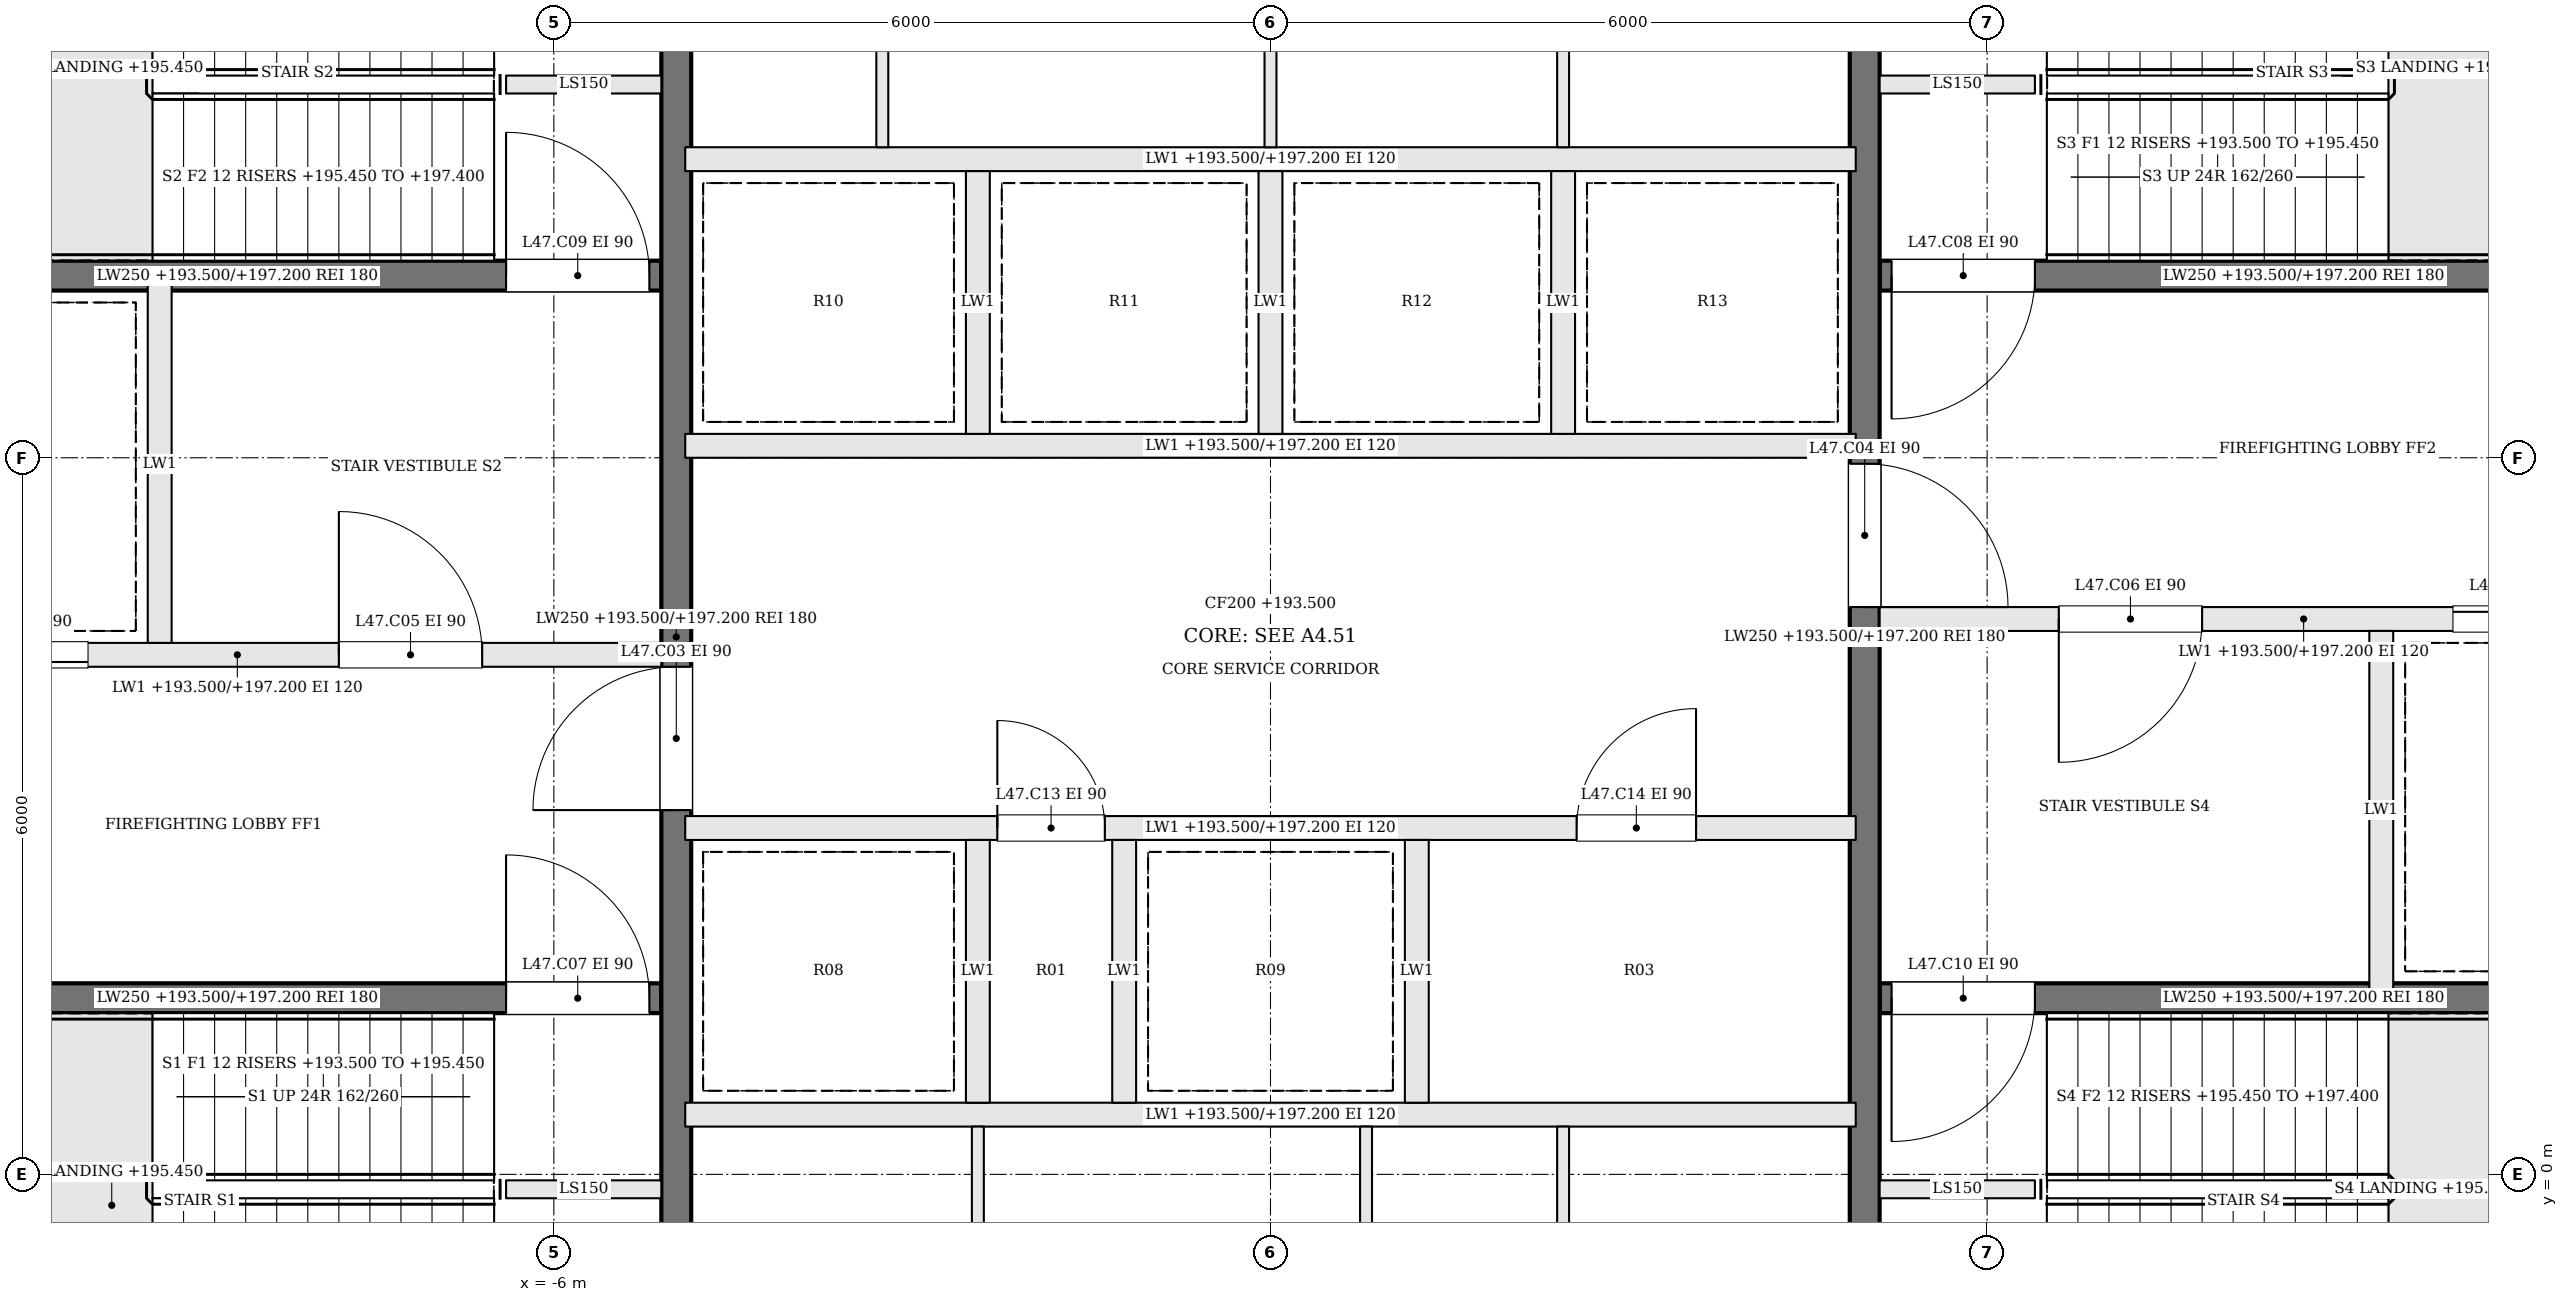
"""IFC4 building model, lengths in metres.
Left out: names, types, materials, properties, quantities, classifications, styles, units other than length and angle.
Written with IfcOpenShell. Run it as: python <this file> out.ifc"""

import sys

from ifc_helpers import new_model, si_unit, direction, frame, frame_2d, origin, place, context, subcontext, project, spatial, rectangle, extrude, element, fill, save


model = new_model("IFC4")
c1 = context("Model", 3, precision=1e-05, world=origin(), true_north=direction((0.0, 1.0)))
c2 = subcontext(c1, "Body", "Model", "MODEL_VIEW")
j1 = project(units=[si_unit("LENGTHUNIT", "METRE"), si_unit("PLANEANGLEUNIT", "RADIAN")], contexts=[c1])
p1 = place(None, origin())
s1 = spatial("IfcSite", under=j1, at=p1, CompositionType="ELEMENT")
p2 = place(p1, origin())
s2 = spatial("IfcBuilding", under=s1, at=p2, CompositionType="ELEMENT")
p3 = place(p2, frame((0.0, 0.0, 193.5)))
s3 = spatial("IfcBuildingStorey", under=s2, at=p3, CompositionType="ELEMENT", Elevation=193.5)
for number, where, z_axis, x_axis in (
    (1, (-6.4, -0.125, 0.0), (0.0, 0.0, 1.0), (1.0, 0.0, 0.0)),
    (2, (6.4, 9.125, 0.0), (0.0, 0.0, 1.0), (-1.0, 0.0, 0.0)),
    (3, (-6.4, 9.125, 0.0), (0.0, 0.0, 1.0), (1.0, 0.0, 0.0)),
    (4, (6.4, -0.125, 0.0), (0.0, 0.0, 1.0), (-1.0, 0.0, 0.0)),
):
    element("IfcWall", number, at=place(p3, frame(where, z_axis=z_axis, x_axis=x_axis)), inside=s3, PredefinedType="SOLIDWALL", context=c2, shape_type="SweptSolid", body=[
        extrude(rectangle(XDim=1.3, YDim=0.15, at=frame_2d((0.65, 0.0))), origin(), (0.0, 0.0, 1.0), 3.7),
    ])
p4 = place(p3, frame((-12.2, 1.475, 0.0), z_axis=(0.0, 0.0, 1.0), x_axis=(1.0, 0.0, 0.0)))
e5 = element("IfcWall", 5, at=p4, inside=s3, PredefinedType="SOLIDWALL", context=c2, shape_type="SweptSolid", body=[
    extrude(rectangle(XDim=7.1, YDim=0.25, at=frame_2d((3.55, 0.0))), origin(), (0.0, 0.0, 1.0), 3.7),
])
p5 = place(p4, frame((5.8, 0.0, 0.0)))
e6 = element("IfcOpeningElement", 6, at=p5, cuts=e5, PredefinedType="OPENING", context=c2, shape_type="SweptSolid", body=[
    extrude(rectangle(XDim=1.2, YDim=2.1, at=frame_2d((0.6, 1.05))), frame((0.0, 0.135, 0.0), z_axis=(0.0, -1.0, 0.0), x_axis=(1.0, 0.0, 0.0)), (0.0, 0.0, 1.0), 0.27),
])
p6 = place(p3, frame((12.2, 7.525, 0.0), z_axis=(0.0, 0.0, 1.0), x_axis=(-1.0, 0.0, 0.0)))
e7 = element("IfcWall", 7, at=p6, inside=s3, PredefinedType="SOLIDWALL", context=c2, shape_type="SweptSolid", body=[
    extrude(rectangle(XDim=7.1, YDim=0.25, at=frame_2d((3.55, 0.0))), origin(), (0.0, 0.0, 1.0), 3.7),
])
p7 = place(p6, frame((5.8, 0.0, 0.0)))
e8 = element("IfcOpeningElement", 8, at=p7, cuts=e7, PredefinedType="OPENING", context=c2, shape_type="SweptSolid", body=[
    extrude(rectangle(XDim=1.2, YDim=2.1, at=frame_2d((0.6, 1.05))), frame((0.0, 0.135, 0.0), z_axis=(0.0, -1.0, 0.0), x_axis=(1.0, 0.0, 0.0)), (0.0, 0.0, 1.0), 0.27),
])
p8 = place(p3, frame((-12.2, 4.35, 0.0), z_axis=(0.0, 0.0, 1.0), x_axis=(1.0, 0.0, 0.0)))
e9 = element("IfcWall", 9, at=p8, inside=s3, PredefinedType="SOLIDWALL", context=c2, shape_type="SweptSolid", body=[
    extrude(rectangle(XDim=7.1, YDim=0.2, at=frame_2d((3.55, 0.0))), origin(), (0.0, 0.0, 1.0), 3.7),
])
p9 = place(p8, frame((4.4, 0.0, 0.0)))
e10 = element("IfcOpeningElement", 10, at=p9, cuts=e9, PredefinedType="OPENING", context=c2, shape_type="SweptSolid", body=[
    extrude(rectangle(XDim=1.2, YDim=2.1, at=frame_2d((0.6, 1.05))), frame((0.0, 0.11, 0.0), z_axis=(0.0, -1.0, 0.0), x_axis=(1.0, 0.0, 0.0)), (0.0, 0.0, 1.0), 0.22),
])
p10 = place(p8, frame((1.1, 0.0, 0.0)))
e11 = element("IfcOpeningElement", 11, at=p10, cuts=e9, PredefinedType="OPENING", context=c2, shape_type="SweptSolid", body=[
    extrude(rectangle(XDim=1.2, YDim=2.1, at=frame_2d((0.6, 1.05))), frame((0.0, 0.11, 0.0), z_axis=(0.0, -1.0, 0.0), x_axis=(1.0, 0.0, 0.0)), (0.0, 0.0, 1.0), 0.22),
])
p11 = place(p3, frame((12.2, 4.65, 0.0), z_axis=(0.0, 0.0, 1.0), x_axis=(-1.0, 0.0, 0.0)))
e12 = element("IfcWall", 12, at=p11, inside=s3, PredefinedType="SOLIDWALL", context=c2, shape_type="SweptSolid", body=[
    extrude(rectangle(XDim=7.1, YDim=0.2, at=frame_2d((3.55, 0.0))), origin(), (0.0, 0.0, 1.0), 3.7),
])
p12 = place(p11, frame((4.4, 0.0, 0.0)))
e13 = element("IfcOpeningElement", 13, at=p12, cuts=e12, PredefinedType="OPENING", context=c2, shape_type="SweptSolid", body=[
    extrude(rectangle(XDim=1.2, YDim=2.1, at=frame_2d((0.6, 1.05))), frame((0.0, 0.11, 0.0), z_axis=(0.0, -1.0, 0.0), x_axis=(1.0, 0.0, 0.0)), (0.0, 0.0, 1.0), 0.22),
])
p13 = place(p11, frame((1.1, 0.0, 0.0)))
e14 = element("IfcOpeningElement", 14, at=p13, cuts=e12, PredefinedType="OPENING", context=c2, shape_type="SweptSolid", body=[
    extrude(rectangle(XDim=1.2, YDim=2.1, at=frame_2d((0.6, 1.05))), frame((0.0, 0.11, 0.0), z_axis=(0.0, -1.0, 0.0), x_axis=(1.0, 0.0, 0.0)), (0.0, 0.0, 1.0), 0.22),
])
p14 = place(p3, frame((-12.2, 7.525, 0.0), z_axis=(0.0, 0.0, 1.0), x_axis=(1.0, 0.0, 0.0)))
e15 = element("IfcWall", 15, at=p14, inside=s3, PredefinedType="SOLIDWALL", context=c2, shape_type="SweptSolid", body=[
    extrude(rectangle(XDim=7.1, YDim=0.25, at=frame_2d((3.55, 0.0))), origin(), (0.0, 0.0, 1.0), 3.7),
])
p15 = place(p14, frame((5.8, 0.0, 0.0)))
e16 = element("IfcOpeningElement", 16, at=p15, cuts=e15, PredefinedType="OPENING", context=c2, shape_type="SweptSolid", body=[
    extrude(rectangle(XDim=1.2, YDim=2.1, at=frame_2d((0.6, 1.05))), frame((0.0, 0.135, 0.0), z_axis=(0.0, -1.0, 0.0), x_axis=(1.0, 0.0, 0.0)), (0.0, 0.0, 1.0), 0.27),
])
p16 = place(p3, frame((12.2, 1.475, 0.0), z_axis=(0.0, 0.0, 1.0), x_axis=(-1.0, 0.0, 0.0)))
e17 = element("IfcWall", 17, at=p16, inside=s3, PredefinedType="SOLIDWALL", context=c2, shape_type="SweptSolid", body=[
    extrude(rectangle(XDim=7.1, YDim=0.25, at=frame_2d((3.55, 0.0))), origin(), (0.0, 0.0, 1.0), 3.7),
])
p17 = place(p16, frame((5.8, 0.0, 0.0)))
e18 = element("IfcOpeningElement", 18, at=p17, cuts=e17, PredefinedType="OPENING", context=c2, shape_type="SweptSolid", body=[
    extrude(rectangle(XDim=1.2, YDim=2.1, at=frame_2d((0.6, 1.05))), frame((0.0, 0.135, 0.0), z_axis=(0.0, -1.0, 0.0), x_axis=(1.0, 0.0, 0.0)), (0.0, 0.0, 1.0), 0.27),
])
for number, where, z_axis, x_axis in (
    (19, (-9.3, 4.45, 0.0), (0.0, 0.0, 1.0), (0.0, 1.0, 0.0)),
    (20, (9.3, 4.55, 0.0), (0.0, 0.0, 1.0), (0.0, -1.0, 0.0)),
):
    element("IfcWall", number, at=place(p3, frame(where, z_axis=z_axis, x_axis=x_axis)), inside=s3, PredefinedType="SOLIDWALL", context=c2, shape_type="SweptSolid", body=[
        extrude(rectangle(XDim=3.0, YDim=0.2, at=frame_2d((1.5, 0.0))), origin(), (0.0, 0.0, 1.0), 3.7),
    ])
p18 = place(p3, frame((-4.975, -2.2, 0.0), z_axis=(0.0, 0.0, 1.0), x_axis=(0.0, 1.0, 0.0)))
e21 = element("IfcWall", 21, at=p18, inside=s3, PredefinedType="SOLIDWALL", context=c2, shape_type="SweptSolid", body=[
    extrude(rectangle(XDim=13.4, YDim=0.25, at=frame_2d((6.7, 0.0))), origin(), (0.0, 0.0, 1.0), 3.7),
])
p19 = place(p18, frame((5.25, 0.0, 0.0)))
e22 = element("IfcOpeningElement", 22, at=p19, cuts=e21, PredefinedType="OPENING", context=c2, shape_type="SweptSolid", body=[
    extrude(rectangle(XDim=1.2, YDim=2.1, at=frame_2d((0.6, 1.05))), frame((0.0, 0.135, 0.0), z_axis=(0.0, -1.0, 0.0), x_axis=(1.0, 0.0, 0.0)), (0.0, 0.0, 1.0), 0.27),
])
p20 = place(p3, frame((4.975, 11.2, 0.0), z_axis=(0.0, 0.0, 1.0), x_axis=(0.0, -1.0, 0.0)))
e23 = element("IfcWall", 23, at=p20, inside=s3, PredefinedType="SOLIDWALL", context=c2, shape_type="SweptSolid", body=[
    extrude(rectangle(XDim=13.4, YDim=0.25, at=frame_2d((6.7, 0.0))), origin(), (0.0, 0.0, 1.0), 3.7),
])
p21 = place(p20, frame((5.25, 0.0, 0.0)))
e24 = element("IfcOpeningElement", 24, at=p21, cuts=e23, PredefinedType="OPENING", context=c2, shape_type="SweptSolid", body=[
    extrude(rectangle(XDim=1.2, YDim=2.1, at=frame_2d((0.6, 1.05))), frame((0.0, 0.135, 0.0), z_axis=(0.0, -1.0, 0.0), x_axis=(1.0, 0.0, 0.0)), (0.0, 0.0, 1.0), 0.27),
])
p22 = place(p3, frame((-4.9, 0.5, 0.0), z_axis=(0.0, 0.0, 1.0), x_axis=(1.0, 0.0, 0.0)))
e25 = element("IfcWall", 25, at=p22, inside=s3, PredefinedType="SOLIDWALL", context=c2, shape_type="SweptSolid", body=[
    extrude(rectangle(XDim=9.8, YDim=0.2, at=frame_2d((4.9, 0.0))), origin(), (0.0, 0.0, 1.0), 3.7),
])
p23 = place(p3, frame((-4.9, 2.9, 0.0), z_axis=(0.0, 0.0, 1.0), x_axis=(1.0, 0.0, 0.0)))
e26 = element("IfcWall", 26, at=p23, inside=s3, PredefinedType="SOLIDWALL", context=c2, shape_type="SweptSolid", body=[
    extrude(rectangle(XDim=9.8, YDim=0.2, at=frame_2d((4.9, 0.0))), origin(), (0.0, 0.0, 1.0), 3.7),
])
p24 = place(p23, frame((2.613, 0.0, 0.0)))
e27 = element("IfcOpeningElement", 27, at=p24, cuts=e26, PredefinedType="OPENING", context=c2, shape_type="SweptSolid", body=[
    extrude(rectangle(XDim=0.9, YDim=2.1, at=frame_2d((0.45, 1.05))), frame((0.0, 0.11, 0.0), z_axis=(0.0, -1.0, 0.0), x_axis=(1.0, 0.0, 0.0)), (0.0, 0.0, 1.0), 0.22),
])
p25 = place(p23, frame((7.463, 0.0, 0.0)))
e28 = element("IfcOpeningElement", 28, at=p25, cuts=e26, PredefinedType="OPENING", context=c2, shape_type="SweptSolid", body=[
    extrude(rectangle(XDim=1.0, YDim=2.1, at=frame_2d((0.5, 1.05))), frame((0.0, 0.11, 0.0), z_axis=(0.0, -1.0, 0.0), x_axis=(1.0, 0.0, 0.0)), (0.0, 0.0, 1.0), 0.22),
])
for number, where, z_axis, x_axis in (
    (29, (-4.9, 6.1, 0.0), (0.0, 0.0, 1.0), (1.0, 0.0, 0.0)),
    (30, (-4.9, 8.5, 0.0), (0.0, 0.0, 1.0), (1.0, 0.0, 0.0)),
):
    element("IfcWall", number, at=place(p3, frame(where, z_axis=z_axis, x_axis=x_axis)), inside=s3, PredefinedType="SOLIDWALL", context=c2, shape_type="SweptSolid", body=[
        extrude(rectangle(XDim=9.8, YDim=0.2, at=frame_2d((4.9, 0.0))), origin(), (0.0, 0.0, 1.0), 3.7),
    ])
for number, where, z_axis, x_axis in (
    (31, (-2.45, 0.6, 0.0), (0.0, 0.0, 1.0), (0.0, 1.0, 0.0)),
    (32, (-1.225, 0.6, 0.0), (0.0, 0.0, 1.0), (0.0, 1.0, 0.0)),
    (33, (1.225, 0.6, 0.0), (0.0, 0.0, 1.0), (0.0, 1.0, 0.0)),
    (34, (-2.45, 6.2, 0.0), (0.0, 0.0, 1.0), (0.0, 1.0, 0.0)),
    (35, (0.0, 6.2, 0.0), (0.0, 0.0, 1.0), (0.0, 1.0, 0.0)),
    (36, (2.45, 6.2, 0.0), (0.0, 0.0, 1.0), (0.0, 1.0, 0.0)),
):
    element("IfcWall", number, at=place(p3, frame(where, z_axis=z_axis, x_axis=x_axis)), inside=s3, PredefinedType="SOLIDWALL", context=c2, shape_type="SweptSolid", body=[
        extrude(rectangle(XDim=2.2, YDim=0.2, at=frame_2d((1.1, 0.0))), origin(), (0.0, 0.0, 1.0), 3.7),
    ])
for number, where, z_axis, x_axis in (
    (37, (-2.45, -2.2, 0.0), (0.0, 0.0, 1.0), (0.0, 1.0, 0.0)),
    (38, (0.8, -2.2, 0.0), (0.0, 0.0, 1.0), (0.0, 1.0, 0.0)),
    (39, (2.45, -2.2, 0.0), (0.0, 0.0, 1.0), (0.0, 1.0, 0.0)),
    (40, (-3.25, 8.6, 0.0), (0.0, 0.0, 1.0), (0.0, 1.0, 0.0)),
    (41, (0.0, 8.6, 0.0), (0.0, 0.0, 1.0), (0.0, 1.0, 0.0)),
    (42, (2.45, 8.6, 0.0), (0.0, 0.0, 1.0), (0.0, 1.0, 0.0)),
):
    element("IfcWall", number, at=place(p3, frame(where, z_axis=z_axis, x_axis=x_axis)), inside=s3, PredefinedType="PARTITIONING", context=c2, shape_type="SweptSolid", body=[
        extrude(rectangle(XDim=2.6, YDim=0.1, at=frame_2d((1.3, 0.0))), origin(), (0.0, 0.0, 1.0), 3.7),
    ])
p26 = place(p19, origin())
e43 = element("IfcDoor", 43, at=p26, inside=s3, OperationType="SINGLE_SWING_LEFT", PredefinedType="DOOR", context=c2, shape_type="SweptSolid", body=[
    extrude(rectangle(XDim=1.2, YDim=2.1, at=frame_2d((0.6, 1.05))), frame((0.0, 0.025, 0.0), z_axis=(0.0, -1.0, 0.0), x_axis=(1.0, 0.0, 0.0)), (0.0, 0.0, 1.0), 0.05),
])
fill(e22, e43)
p27 = place(p21, origin())
e44 = element("IfcDoor", 44, at=p27, inside=s3, OperationType="SINGLE_SWING_RIGHT", PredefinedType="DOOR", context=c2, shape_type="SweptSolid", body=[
    extrude(rectangle(XDim=1.2, YDim=2.1, at=frame_2d((0.6, 1.05))), frame((0.0, 0.025, 0.0), z_axis=(0.0, -1.0, 0.0), x_axis=(1.0, 0.0, 0.0)), (0.0, 0.0, 1.0), 0.05),
])
fill(e24, e44)
p28 = place(p9, origin())
e45 = element("IfcDoor", 45, at=p28, inside=s3, OperationType="SINGLE_SWING_LEFT", PredefinedType="DOOR", context=c2, shape_type="SweptSolid", body=[
    extrude(rectangle(XDim=1.2, YDim=2.1, at=frame_2d((0.6, 1.05))), frame((0.0, 0.025, 0.0), z_axis=(0.0, -1.0, 0.0), x_axis=(1.0, 0.0, 0.0)), (0.0, 0.0, 1.0), 0.05),
])
fill(e10, e45)
p29 = place(p12, origin())
e46 = element("IfcDoor", 46, at=p29, inside=s3, OperationType="SINGLE_SWING_RIGHT", PredefinedType="DOOR", context=c2, shape_type="SweptSolid", body=[
    extrude(rectangle(XDim=1.2, YDim=2.1, at=frame_2d((0.6, 1.05))), frame((0.0, 0.025, 0.0), z_axis=(0.0, -1.0, 0.0), x_axis=(1.0, 0.0, 0.0)), (0.0, 0.0, 1.0), 0.05),
])
fill(e13, e46)
p30 = place(p5, origin())
e47 = element("IfcDoor", 47, at=p30, inside=s3, OperationType="SINGLE_SWING_LEFT", PredefinedType="DOOR", context=c2, shape_type="SweptSolid", body=[
    extrude(rectangle(XDim=1.2, YDim=2.1, at=frame_2d((0.6, 1.05))), frame((0.0, 0.025, 0.0), z_axis=(0.0, -1.0, 0.0), x_axis=(1.0, 0.0, 0.0)), (0.0, 0.0, 1.0), 0.05),
])
fill(e6, e47)
p31 = place(p7, origin())
e48 = element("IfcDoor", 48, at=p31, inside=s3, OperationType="SINGLE_SWING_RIGHT", PredefinedType="DOOR", context=c2, shape_type="SweptSolid", body=[
    extrude(rectangle(XDim=1.2, YDim=2.1, at=frame_2d((0.6, 1.05))), frame((0.0, 0.025, 0.0), z_axis=(0.0, -1.0, 0.0), x_axis=(1.0, 0.0, 0.0)), (0.0, 0.0, 1.0), 0.05),
])
fill(e8, e48)
p32 = place(p15, origin())
e49 = element("IfcDoor", 49, at=p32, inside=s3, OperationType="SINGLE_SWING_LEFT", PredefinedType="DOOR", context=c2, shape_type="SweptSolid", body=[
    extrude(rectangle(XDim=1.2, YDim=2.1, at=frame_2d((0.6, 1.05))), frame((0.0, 0.025, 0.0), z_axis=(0.0, -1.0, 0.0), x_axis=(1.0, 0.0, 0.0)), (0.0, 0.0, 1.0), 0.05),
])
fill(e16, e49)
p33 = place(p17, origin())
e50 = element("IfcDoor", 50, at=p33, inside=s3, OperationType="SINGLE_SWING_RIGHT", PredefinedType="DOOR", context=c2, shape_type="SweptSolid", body=[
    extrude(rectangle(XDim=1.2, YDim=2.1, at=frame_2d((0.6, 1.05))), frame((0.0, 0.025, 0.0), z_axis=(0.0, -1.0, 0.0), x_axis=(1.0, 0.0, 0.0)), (0.0, 0.0, 1.0), 0.05),
])
fill(e18, e50)
p34 = place(p10, origin())
e51 = element("IfcDoor", 51, at=p34, inside=s3, OperationType="SLIDING_TO_RIGHT", PredefinedType="DOOR", context=c2, shape_type="SweptSolid", body=[
    extrude(rectangle(XDim=1.2, YDim=2.1, at=frame_2d((0.6, 1.05))), frame((0.0, 0.025, 0.0), z_axis=(0.0, -1.0, 0.0), x_axis=(1.0, 0.0, 0.0)), (0.0, 0.0, 1.0), 0.05),
])
fill(e11, e51)
p35 = place(p13, origin())
e52 = element("IfcDoor", 52, at=p35, inside=s3, OperationType="SLIDING_TO_RIGHT", PredefinedType="DOOR", context=c2, shape_type="SweptSolid", body=[
    extrude(rectangle(XDim=1.2, YDim=2.1, at=frame_2d((0.6, 1.05))), frame((0.0, 0.025, 0.0), z_axis=(0.0, -1.0, 0.0), x_axis=(1.0, 0.0, 0.0)), (0.0, 0.0, 1.0), 0.05),
])
fill(e14, e52)
p36 = place(p24, origin())
e53 = element("IfcDoor", 53, at=p36, inside=s3, OperationType="SINGLE_SWING_LEFT", PredefinedType="DOOR", context=c2, shape_type="SweptSolid", body=[
    extrude(rectangle(XDim=0.9, YDim=2.1, at=frame_2d((0.45, 1.05))), frame((0.0, 0.025, 0.0), z_axis=(0.0, -1.0, 0.0), x_axis=(1.0, 0.0, 0.0)), (0.0, 0.0, 1.0), 0.05),
])
fill(e27, e53)
p37 = place(p25, origin())
e54 = element("IfcDoor", 54, at=p37, inside=s3, OperationType="SINGLE_SWING_RIGHT", PredefinedType="DOOR", context=c2, shape_type="SweptSolid", body=[
    extrude(rectangle(XDim=1.0, YDim=2.1, at=frame_2d((0.5, 1.05))), frame((0.0, 0.025, 0.0), z_axis=(0.0, -1.0, 0.0), x_axis=(1.0, 0.0, 0.0)), (0.0, 0.0, 1.0), 0.05),
])
fill(e28, e54)
save(model, sys.argv[1])
